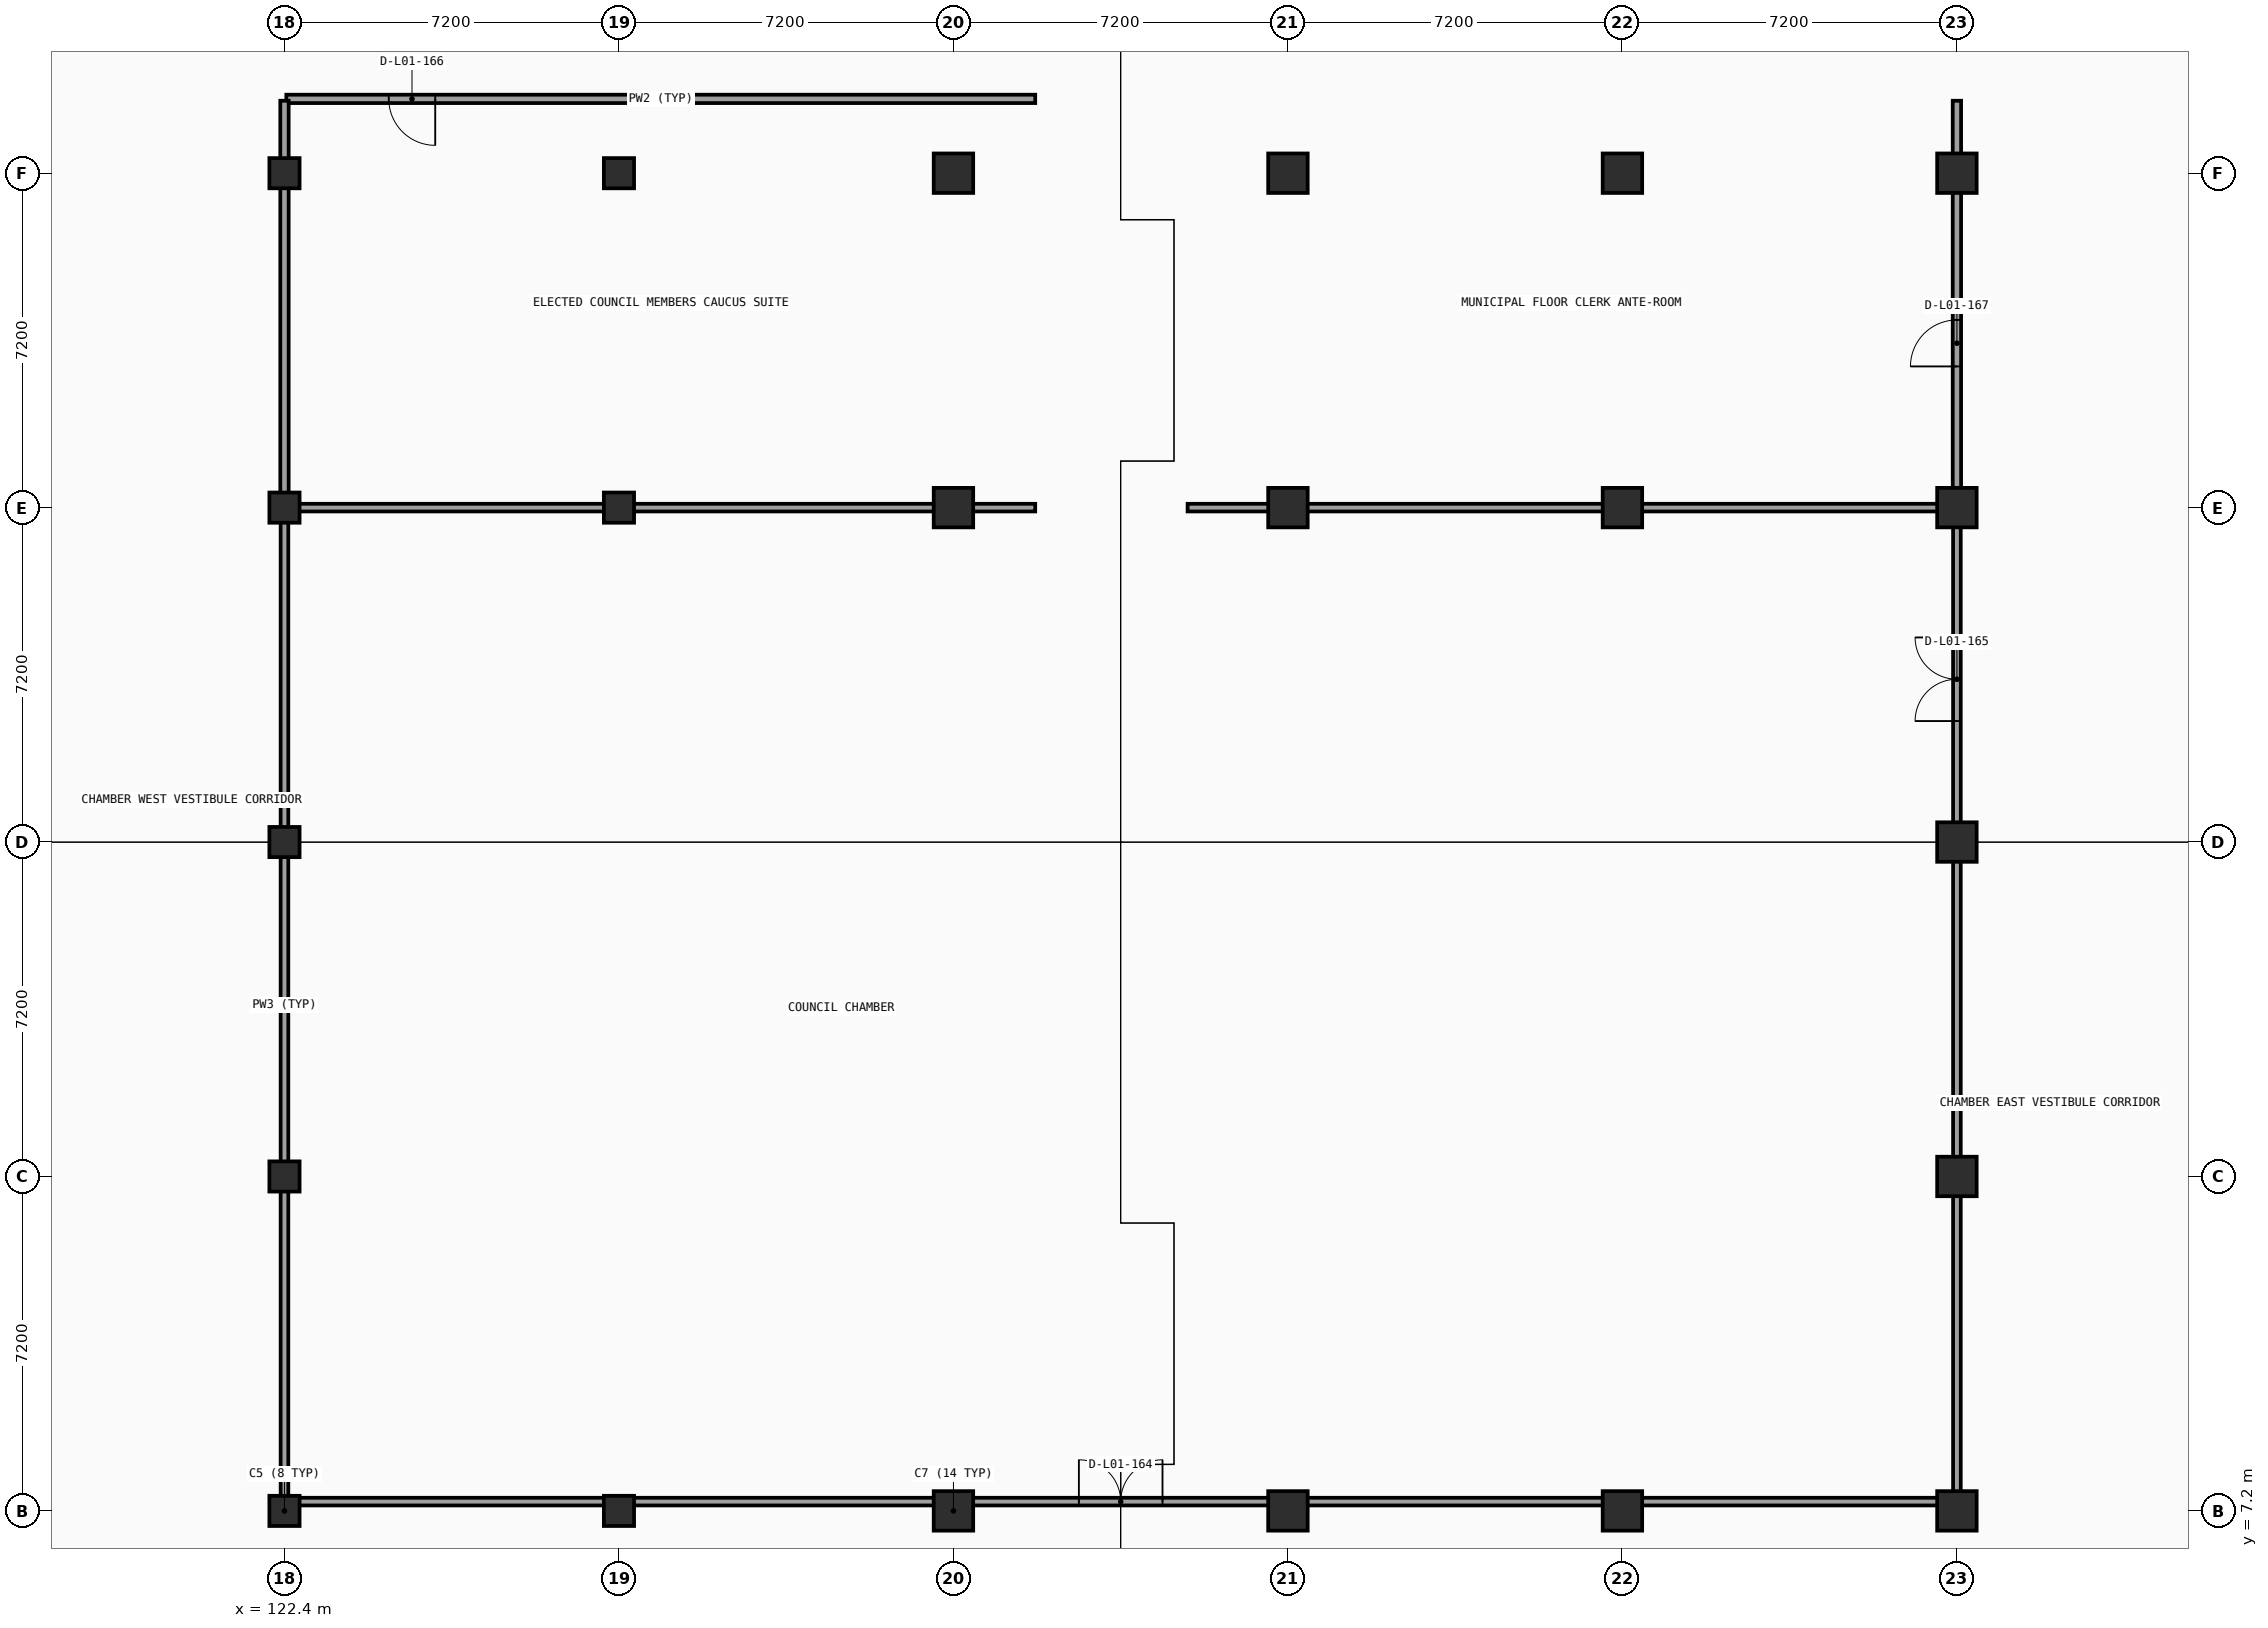
"""IFC4 building model, lengths in metres.
Left out: names, types, materials, properties, quantities, classifications, styles, units other than length and angle.
Written with IfcOpenShell. Run it as: python <this file> out.ifc"""

import sys

from ifc_helpers import new_model, si_unit, direction, frame, frame_2d, origin, origin_2d, place, context, subcontext, project, spatial, rectangle, circle, extrude, element, fill, save


model = new_model("IFC4")
c1 = context("Model", 3, precision=1e-05, world=origin(), true_north=direction((0.0, 1.0)))
c2 = subcontext(c1, "Body", "Model", "MODEL_VIEW")
j1 = project(units=[si_unit("LENGTHUNIT", "METRE"), si_unit("PLANEANGLEUNIT", "RADIAN")], contexts=[c1])
p1 = place(None, origin())
s1 = spatial("IfcSite", under=j1, at=p1, CompositionType="ELEMENT")
p2 = place(p1, origin())
s2 = spatial("IfcBuilding", under=s1, at=p2, CompositionType="ELEMENT")
p3 = place(p2, frame((0.0, 0.0, 5.4)))
s3 = spatial("IfcBuildingStorey", under=s2, at=p3, CompositionType="ELEMENT", Elevation=5.4)
for number, where, z_axis, x_axis in (
    (1, (122.4, 7.2, 0.0), (0.0, 0.0, 1.0), (1.0, 0.0, 0.0)),
    (2, (122.4, 14.4, 0.0), (0.0, 0.0, 1.0), (1.0, 0.0, 0.0)),
    (3, (122.4, 21.6, 0.0), (0.0, 0.0, 1.0), (1.0, 0.0, 0.0)),
    (4, (122.4, 28.8, 0.0), (0.0, 0.0, 1.0), (1.0, 0.0, 0.0)),
    (5, (122.4, 36.0, 0.0), (0.0, 0.0, 1.0), (1.0, 0.0, 0.0)),
    (6, (129.6, 7.2, 0.0), (0.0, 0.0, 1.0), (1.0, 0.0, 0.0)),
    (7, (129.6, 28.8, 0.0), (0.0, 0.0, 1.0), (1.0, 0.0, 0.0)),
    (8, (129.6, 36.0, 0.0), (0.0, 0.0, 1.0), (1.0, 0.0, 0.0)),
):
    element("IfcColumn", number, at=place(p3, frame(where, z_axis=z_axis, x_axis=x_axis)), inside=s3, PredefinedType="COLUMN", context=c2, shape_type="SweptSolid", body=[
        extrude(rectangle(XDim=0.65, YDim=0.65, at=origin_2d()), origin(), (0.0, 0.0, 1.0), 4.8),
    ])
for number, where, z_axis, x_axis in (
    (9, (136.8, 7.2, 0.0), (0.0, 0.0, 1.0), (1.0, 0.0, 0.0)),
    (10, (136.8, 28.8, 0.0), (0.0, 0.0, 1.0), (1.0, 0.0, 0.0)),
    (11, (136.8, 36.0, 0.0), (0.0, 0.0, 1.0), (1.0, 0.0, 0.0)),
    (12, (144.0, 7.2, 0.0), (0.0, 0.0, 1.0), (1.0, 0.0, 0.0)),
    (13, (144.0, 28.8, 0.0), (0.0, 0.0, 1.0), (1.0, 0.0, 0.0)),
    (14, (144.0, 36.0, 0.0), (0.0, 0.0, 1.0), (1.0, 0.0, 0.0)),
    (15, (151.2, 7.2, 0.0), (0.0, 0.0, 1.0), (1.0, 0.0, 0.0)),
    (16, (151.2, 28.8, 0.0), (0.0, 0.0, 1.0), (1.0, 0.0, 0.0)),
    (17, (151.2, 36.0, 0.0), (0.0, 0.0, 1.0), (1.0, 0.0, 0.0)),
    (18, (158.4, 7.2, 0.0), (0.0, 0.0, 1.0), (1.0, 0.0, 0.0)),
    (19, (158.4, 14.4, 0.0), (0.0, 0.0, 1.0), (1.0, 0.0, 0.0)),
    (20, (158.4, 21.6, 0.0), (0.0, 0.0, 1.0), (1.0, 0.0, 0.0)),
    (21, (158.4, 28.8, 0.0), (0.0, 0.0, 1.0), (1.0, 0.0, 0.0)),
    (22, (158.4, 36.0, 0.0), (0.0, 0.0, 1.0), (1.0, 0.0, 0.0)),
):
    element("IfcColumn", number, at=place(p3, frame(where, z_axis=z_axis, x_axis=x_axis)), inside=s3, PredefinedType="COLUMN", context=c2, shape_type="SweptSolid", body=[
        extrude(circle(Radius=0.425, at=origin_2d()), origin(), (0.0, 0.0, 1.0), 4.8),
    ])
p4 = place(p3, frame((122.44, 37.6, 0.0), z_axis=(0.0, 0.0, 1.0), x_axis=(1.0, 0.0, 0.0)))
e23 = element("IfcWall", 23, at=p4, inside=s3, PredefinedType="PARTITIONING", context=c2, shape_type="SweptSolid", body=[
    extrude(rectangle(XDim=16.12, YDim=0.18, at=frame_2d((8.06, 0.0))), origin(), (0.0, 0.0, 1.0), 3.801),
])
p5 = place(p4, frame((2.205, 0.0, 0.0)))
e24 = element("IfcOpeningElement", 24, at=p5, cuts=e23, PredefinedType="OPENING", context=c2, shape_type="SweptSolid", body=[
    extrude(rectangle(XDim=1.0, YDim=2.1, at=frame_2d((0.5, 1.05))), frame((0.0, 0.1, 0.0), z_axis=(0.0, -1.0, 0.0), x_axis=(1.0, 0.0, 0.0)), (0.0, 0.0, 1.0), 0.2),
])
p6 = place(p3, frame((122.44, 7.4, 0.0), z_axis=(0.0, 0.0, 1.0), x_axis=(1.0, 0.0, 0.0)))
e25 = element("IfcWall", 25, at=p6, inside=s3, PredefinedType="PARTITIONING", context=c2, shape_type="SweptSolid", body=[
    extrude(rectangle(XDim=35.92, YDim=0.165, at=frame_2d((17.96, 0.0))), origin(), (0.0, 0.0, 1.0), 4.52),
])
p7 = place(p6, frame((17.06, 0.0, 0.0)))
e26 = element("IfcOpeningElement", 26, at=p7, cuts=e25, PredefinedType="OPENING", context=c2, shape_type="SweptSolid", body=[
    extrude(rectangle(XDim=1.8, YDim=2.15, at=frame_2d((0.9, 1.075))), frame((0.0, 0.093, 0.0), z_axis=(0.0, -1.0, 0.0), x_axis=(1.0, 0.0, 0.0)), (0.0, 0.0, 1.0), 0.185),
])
p8 = place(p3, frame((122.4, 7.44, 0.0), z_axis=(0.0, 0.0, 1.0), x_axis=(0.0, 1.0, 0.0)))
e27 = element("IfcWall", 27, at=p8, inside=s3, PredefinedType="PARTITIONING", context=c2, shape_type="SweptSolid", body=[
    extrude(rectangle(XDim=21.32, YDim=0.165, at=frame_2d((10.66, 0.0))), origin(), (0.0, 0.0, 1.0), 3.889),
])
p9 = place(p3, frame((122.4, 28.84, 0.0), z_axis=(0.0, 0.0, 1.0), x_axis=(0.0, 1.0, 0.0)))
e28 = element("IfcWall", 28, at=p9, inside=s3, PredefinedType="PARTITIONING", context=c2, shape_type="SweptSolid", body=[
    extrude(rectangle(XDim=8.72, YDim=0.18, at=frame_2d((4.36, 0.0))), origin(), (0.0, 0.0, 1.0), 3.801),
])
p10 = place(p3, frame((158.4, 7.44, 0.0), z_axis=(0.0, 0.0, 1.0), x_axis=(0.0, 1.0, 0.0)))
e29 = element("IfcWall", 29, at=p10, inside=s3, PredefinedType="PARTITIONING", context=c2, shape_type="SweptSolid", body=[
    extrude(rectangle(XDim=21.32, YDim=0.165, at=frame_2d((10.66, 0.0))), origin(), (0.0, 0.0, 1.0), 3.889),
])
p11 = place(p10, frame((16.765, 0.0, 0.0)))
e30 = element("IfcOpeningElement", 30, at=p11, cuts=e29, PredefinedType="OPENING", context=c2, shape_type="SweptSolid", body=[
    extrude(rectangle(XDim=1.8, YDim=2.15, at=frame_2d((0.9, 1.075))), frame((0.0, 0.093, 0.0), z_axis=(0.0, -1.0, 0.0), x_axis=(1.0, 0.0, 0.0)), (0.0, 0.0, 1.0), 0.185),
])
p12 = place(p3, frame((158.4, 28.84, 0.0), z_axis=(0.0, 0.0, 1.0), x_axis=(0.0, 1.0, 0.0)))
e31 = element("IfcWall", 31, at=p12, inside=s3, PredefinedType="PARTITIONING", context=c2, shape_type="SweptSolid", body=[
    extrude(rectangle(XDim=8.72, YDim=0.18, at=frame_2d((4.36, 0.0))), origin(), (0.0, 0.0, 1.0), 3.801),
])
p13 = place(p12, frame((3.0, 0.0, 0.0)))
e32 = element("IfcOpeningElement", 32, at=p13, cuts=e31, PredefinedType="OPENING", context=c2, shape_type="SweptSolid", body=[
    extrude(rectangle(XDim=1.0, YDim=2.1, at=frame_2d((0.5, 1.05))), frame((0.0, 0.1, 0.0), z_axis=(0.0, -1.0, 0.0), x_axis=(1.0, 0.0, 0.0)), (0.0, 0.0, 1.0), 0.2),
])
p14 = place(p3, frame((122.44, 28.8, 0.0), z_axis=(0.0, 0.0, 1.0), x_axis=(1.0, 0.0, 0.0)))
e33 = element("IfcWall", 33, at=p14, inside=s3, PredefinedType="PARTITIONING", context=c2, shape_type="SweptSolid", body=[
    extrude(rectangle(XDim=16.12, YDim=0.165, at=frame_2d((8.06, 0.0))), origin(), (0.0, 0.0, 1.0), 3.801),
])
p15 = place(p3, frame((141.84, 28.8, 0.0), z_axis=(0.0, 0.0, 1.0), x_axis=(1.0, 0.0, 0.0)))
e34 = element("IfcWall", 34, at=p15, inside=s3, PredefinedType="PARTITIONING", context=c2, shape_type="SweptSolid", body=[
    extrude(rectangle(XDim=16.52, YDim=0.165, at=frame_2d((8.26, 0.0))), origin(), (0.0, 0.0, 1.0), 3.801),
])
p16 = place(p7, origin())
e35 = element("IfcDoor", 35, at=p16, inside=s3, OperationType="DOUBLE_DOOR_SINGLE_SWING", PredefinedType="DOOR", context=c2, shape_type="SweptSolid", body=[
    extrude(rectangle(XDim=1.8, YDim=2.15, at=frame_2d((0.9, 1.075))), frame((0.0, 0.025, 0.0), z_axis=(0.0, -1.0, 0.0), x_axis=(1.0, 0.0, 0.0)), (0.0, 0.0, 1.0), 0.05),
])
fill(e26, e35)
p17 = place(p11, origin())
e36 = element("IfcDoor", 36, at=p17, inside=s3, OperationType="DOUBLE_DOOR_SINGLE_SWING", PredefinedType="DOOR", context=c2, shape_type="SweptSolid", body=[
    extrude(rectangle(XDim=1.8, YDim=2.15, at=frame_2d((0.9, 1.075))), frame((0.0, 0.025, 0.0), z_axis=(0.0, -1.0, 0.0), x_axis=(1.0, 0.0, 0.0)), (0.0, 0.0, 1.0), 0.05),
])
fill(e30, e36)
p18 = place(p5, origin())
e37 = element("IfcDoor", 37, at=p18, inside=s3, OperationType="SINGLE_SWING_RIGHT", PredefinedType="DOOR", context=c2, shape_type="SweptSolid", body=[
    extrude(rectangle(XDim=1.0, YDim=2.1, at=frame_2d((0.5, 1.05))), frame((0.0, 0.025, 0.0), z_axis=(0.0, -1.0, 0.0), x_axis=(1.0, 0.0, 0.0)), (0.0, 0.0, 1.0), 0.05),
])
fill(e24, e37)
p19 = place(p13, origin())
e38 = element("IfcDoor", 38, at=p19, inside=s3, OperationType="SINGLE_SWING_LEFT", PredefinedType="DOOR", context=c2, shape_type="SweptSolid", body=[
    extrude(rectangle(XDim=1.0, YDim=2.1, at=frame_2d((0.5, 1.05))), frame((0.0, 0.025, 0.0), z_axis=(0.0, -1.0, 0.0), x_axis=(1.0, 0.0, 0.0)), (0.0, 0.0, 1.0), 0.05),
])
fill(e32, e38)
save(model, sys.argv[1])
